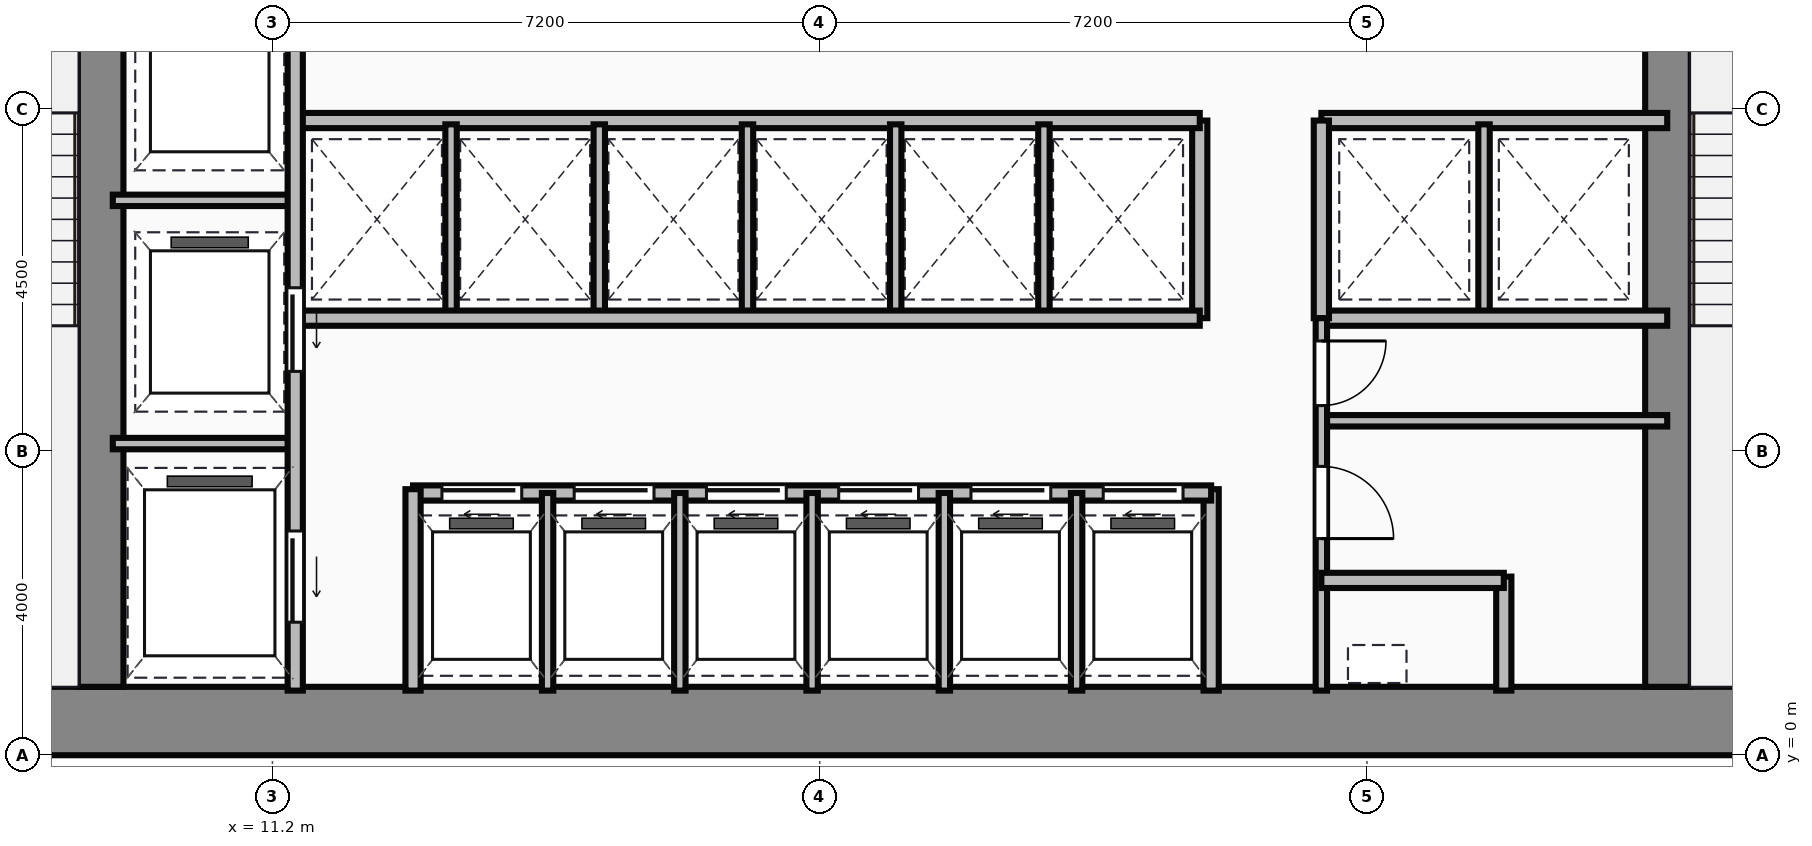
"""IFC4 building model, lengths in metres.
Left out: names, types, materials, properties, quantities, classifications, styles, units other than length and angle.
Written with IfcOpenShell. Run it as: python <this file> out.ifc"""

import sys

from ifc_helpers import new_model, si_unit, direction, frame, frame_2d, origin, place, context, subcontext, project, spatial, rectangle, extrude, source, transform, mapped, element, fill, save


model = new_model("IFC4")
c1 = context("Model", 3, precision=1e-05, world=origin(), true_north=direction((0.0, 1.0)))
c2 = subcontext(c1, "Body", "Model", "MODEL_VIEW")
j1 = project(units=[si_unit("LENGTHUNIT", "METRE"), si_unit("PLANEANGLEUNIT", "RADIAN")], contexts=[c1])
p1 = place(None, origin())
s1 = spatial("IfcSite", under=j1, at=p1, CompositionType="ELEMENT")
p2 = place(p1, origin())
s2 = spatial("IfcBuilding", under=s1, at=p2, CompositionType="ELEMENT")
p3 = place(p2, frame((0.0, 0.0, 58.05)))
s3 = spatial("IfcBuildingStorey", under=s2, at=p3, CompositionType="ELEMENT", Elevation=58.05)
m1 = source(origin(), c2, "Body", "SweptSolid", [
    extrude(rectangle(XDim=29.5, YDim=0.9, at=frame_2d((14.75, 0.0))), origin(), (0.0, 0.0, 1.0), 3.65),
])
p4 = place(p3, frame((4.5, 0.45, 0.0), z_axis=(0.0, 0.0, 1.0), x_axis=(1.0, 0.0, 0.0)))
e1 = element("IfcWall", 1, at=p4, inside=s3, PredefinedType="SHEAR", context=c2, shape_type="MappedRepresentation", body=[
    mapped(m1, transform((0.0, 0.0, 0.0))),
])
m2 = source(origin(), c2, "Body", "SweptSolid", [
    extrude(rectangle(XDim=12.2, YDim=0.6, at=frame_2d((6.1, 0.0))), origin(), (0.0, 0.0, 1.0), 3.65),
])
for number, where, z_axis, x_axis in (
    (2, (8.94, 0.9, 0.0), (0.0, 0.0, 1.0), (0.0, 1.0, 0.0)),
    (3, (29.56, 0.9, 0.0), (0.0, 0.0, 1.0), (0.0, 1.0, 0.0)),
):
    element("IfcWall", number, at=place(p3, frame(where, z_axis=z_axis, x_axis=x_axis)), inside=s3, PredefinedType="SHEAR", context=c2, shape_type="MappedRepresentation", body=[
        mapped(m2, transform((0.0, 0.0, 0.0))),
    ])
m3 = source(origin(), c2, "Body", "SweptSolid", [
    extrude(rectangle(XDim=9.6, YDim=0.2, at=frame_2d((4.8, 0.0))), origin(), (0.0, 0.0, 1.0), 3.4),
])
p5 = place(p3, frame((11.5, 0.85, 0.0), z_axis=(0.0, 0.0, 1.0), x_axis=(0.0, 1.0, 0.0)))
e4 = element("IfcWall", 4, at=p5, inside=s3, PredefinedType="PARTITIONING", context=c2, shape_type="MappedRepresentation", body=[
    mapped(m3, transform((0.0, 0.0, 0.0))),
])
p6 = place(p5, frame((4.2, 0.0, 0.0)))
e5 = element("IfcOpeningElement", 5, at=p6, cuts=e4, PredefinedType="OPENING", context=c2, shape_type="SweptSolid", body=[
    extrude(rectangle(XDim=1.1, YDim=2.15, at=frame_2d((0.55, 1.075))), frame((0.0, 0.11, 0.0), z_axis=(0.0, -1.0, 0.0), x_axis=(1.0, 0.0, 0.0)), (0.0, 0.0, 1.0), 0.22),
])
p7 = place(p5, frame((0.9, 0.0, 0.0)))
e6 = element("IfcOpeningElement", 6, at=p7, cuts=e4, PredefinedType="OPENING", context=c2, shape_type="SweptSolid", body=[
    extrude(rectangle(XDim=1.2, YDim=2.15, at=frame_2d((0.6, 1.075))), frame((0.0, 0.11, 0.0), z_axis=(0.0, -1.0, 0.0), x_axis=(1.0, 0.0, 0.0)), (0.0, 0.0, 1.0), 0.22),
])
m4 = source(origin(), c2, "Body", "SweptSolid", [
    extrude(rectangle(XDim=2.4, YDim=0.15, at=frame_2d((1.2, 0.0))), origin(), (0.0, 0.0, 1.0), 3.4),
])
for number, where, z_axis, x_axis in (
    (7, (9.1, 4.1, 0.0), (0.0, 0.0, 1.0), (1.0, 0.0, 0.0)),
    (8, (9.1, 7.3, 0.0), (0.0, 0.0, 1.0), (1.0, 0.0, 0.0)),
):
    element("IfcWall", number, at=place(p3, frame(where, z_axis=z_axis, x_axis=x_axis)), inside=s3, PredefinedType="PARTITIONING", context=c2, shape_type="MappedRepresentation", body=[
        mapped(m4, transform((0.0, 0.0, 0.0))),
    ])
m5 = source(origin(), c2, "Body", "SweptSolid", [
    extrude(rectangle(XDim=2.65, YDim=0.2, at=frame_2d((1.325, 0.0))), origin(), (0.0, 0.0, 1.0), 3.4),
])
p8 = place(p3, frame((13.05, 0.85, 0.0), z_axis=(0.0, 0.0, 1.0), x_axis=(0.0, 1.0, 0.0)))
e9 = element("IfcWall", 9, at=p8, inside=s3, PredefinedType="PARTITIONING", context=c2, shape_type="MappedRepresentation", body=[
    mapped(m5, transform((0.0, 0.0, 0.0))),
])
m6 = source(origin(), c2, "Body", "SweptSolid", [
    extrude(rectangle(XDim=10.5, YDim=0.2, at=frame_2d((5.25, 0.0))), origin(), (0.0, 0.0, 1.0), 3.4),
])
p9 = place(p3, frame((13.05, 3.45, 0.0), z_axis=(0.0, 0.0, 1.0), x_axis=(1.0, 0.0, 0.0)))
e10 = element("IfcWall", 10, at=p9, inside=s3, PredefinedType="PARTITIONING", context=c2, shape_type="MappedRepresentation", body=[
    mapped(m6, transform((0.0, 0.0, 0.0))),
])
p10 = place(p9, frame((0.38, 0.0, 0.0)))
e11 = element("IfcOpeningElement", 11, at=p10, cuts=e10, PredefinedType="OPENING", context=c2, shape_type="SweptSolid", body=[
    extrude(rectangle(XDim=1.05, YDim=2.15, at=frame_2d((0.525, 1.075))), frame((0.0, 0.11, 0.0), z_axis=(0.0, -1.0, 0.0), x_axis=(1.0, 0.0, 0.0)), (0.0, 0.0, 1.0), 0.22),
])
p11 = place(p9, frame((2.12, 0.0, 0.0)))
e12 = element("IfcOpeningElement", 12, at=p11, cuts=e10, PredefinedType="OPENING", context=c2, shape_type="SweptSolid", body=[
    extrude(rectangle(XDim=1.05, YDim=2.15, at=frame_2d((0.525, 1.075))), frame((0.0, 0.11, 0.0), z_axis=(0.0, -1.0, 0.0), x_axis=(1.0, 0.0, 0.0)), (0.0, 0.0, 1.0), 0.22),
])
p12 = place(p9, frame((3.86, 0.0, 0.0)))
e13 = element("IfcOpeningElement", 13, at=p12, cuts=e10, PredefinedType="OPENING", context=c2, shape_type="SweptSolid", body=[
    extrude(rectangle(XDim=1.05, YDim=2.15, at=frame_2d((0.525, 1.075))), frame((0.0, 0.11, 0.0), z_axis=(0.0, -1.0, 0.0), x_axis=(1.0, 0.0, 0.0)), (0.0, 0.0, 1.0), 0.22),
])
p13 = place(p9, frame((5.6, 0.0, 0.0)))
e14 = element("IfcOpeningElement", 14, at=p13, cuts=e10, PredefinedType="OPENING", context=c2, shape_type="SweptSolid", body=[
    extrude(rectangle(XDim=1.05, YDim=2.15, at=frame_2d((0.525, 1.075))), frame((0.0, 0.11, 0.0), z_axis=(0.0, -1.0, 0.0), x_axis=(1.0, 0.0, 0.0)), (0.0, 0.0, 1.0), 0.22),
])
p14 = place(p9, frame((7.34, 0.0, 0.0)))
e15 = element("IfcOpeningElement", 15, at=p14, cuts=e10, PredefinedType="OPENING", context=c2, shape_type="SweptSolid", body=[
    extrude(rectangle(XDim=1.05, YDim=2.15, at=frame_2d((0.525, 1.075))), frame((0.0, 0.11, 0.0), z_axis=(0.0, -1.0, 0.0), x_axis=(1.0, 0.0, 0.0)), (0.0, 0.0, 1.0), 0.22),
])
p15 = place(p9, frame((9.08, 0.0, 0.0)))
e16 = element("IfcOpeningElement", 16, at=p15, cuts=e10, PredefinedType="OPENING", context=c2, shape_type="SweptSolid", body=[
    extrude(rectangle(XDim=1.05, YDim=2.15, at=frame_2d((0.525, 1.075))), frame((0.0, 0.11, 0.0), z_axis=(0.0, -1.0, 0.0), x_axis=(1.0, 0.0, 0.0)), (0.0, 0.0, 1.0), 0.22),
])
p16 = place(p3, frame((23.55, 0.85, 0.0), z_axis=(0.0, 0.0, 1.0), x_axis=(0.0, 1.0, 0.0)))
e17 = element("IfcWall", 17, at=p16, inside=s3, PredefinedType="PARTITIONING", context=c2, shape_type="MappedRepresentation", body=[
    mapped(m5, transform((0.0, 0.0, 0.0))),
])
m7 = source(origin(), c2, "Body", "SweptSolid", [
    extrude(rectangle(XDim=2.6, YDim=0.15, at=frame_2d((1.3, 0.0))), origin(), (0.0, 0.0, 1.0), 3.4),
])
for number, where, z_axis, x_axis in (
    (18, (14.82, 0.85, 0.0), (0.0, 0.0, 1.0), (0.0, 1.0, 0.0)),
    (19, (16.56, 0.85, 0.0), (0.0, 0.0, 1.0), (0.0, 1.0, 0.0)),
    (20, (18.3, 0.85, 0.0), (0.0, 0.0, 1.0), (0.0, 1.0, 0.0)),
    (21, (20.04, 0.85, 0.0), (0.0, 0.0, 1.0), (0.0, 1.0, 0.0)),
    (22, (21.78, 0.85, 0.0), (0.0, 0.0, 1.0), (0.0, 1.0, 0.0)),
):
    element("IfcWall", number, at=place(p3, frame(where, z_axis=z_axis, x_axis=x_axis)), inside=s3, PredefinedType="PARTITIONING", context=c2, shape_type="MappedRepresentation", body=[
        mapped(m7, transform((0.0, 0.0, 0.0))),
    ])
m8 = source(origin(), c2, "Body", "SweptSolid", [
    extrude(rectangle(XDim=11.85, YDim=0.2, at=frame_2d((5.925, 0.0))), origin(), (0.0, 0.0, 1.0), 3.4),
])
for number, where, z_axis, x_axis in (
    (23, (11.55, 5.75, 0.0), (0.0, 0.0, 1.0), (1.0, 0.0, 0.0)),
    (24, (11.55, 8.35, 0.0), (0.0, 0.0, 1.0), (1.0, 0.0, 0.0)),
):
    element("IfcWall", number, at=place(p3, frame(where, z_axis=z_axis, x_axis=x_axis)), inside=s3, PredefinedType="PARTITIONING", context=c2, shape_type="MappedRepresentation", body=[
        mapped(m8, transform((0.0, 0.0, 0.0))),
    ])
m9 = source(origin(), c2, "Body", "SweptSolid", [
    extrude(rectangle(XDim=2.6, YDim=0.2, at=frame_2d((1.3, 0.0))), origin(), (0.0, 0.0, 1.0), 3.4),
])
p17 = place(p3, frame((23.4, 5.75, 0.0), z_axis=(0.0, 0.0, 1.0), x_axis=(0.0, 1.0, 0.0)))
e25 = element("IfcWall", 25, at=p17, inside=s3, PredefinedType="PARTITIONING", context=c2, shape_type="MappedRepresentation", body=[
    mapped(m9, transform((0.0, 0.0, 0.0))),
])
m10 = source(origin(), c2, "Body", "SweptSolid", [
    extrude(rectangle(XDim=2.5, YDim=0.15, at=frame_2d((1.25, 0.0))), origin(), (0.0, 0.0, 1.0), 3.4),
])
for number, where, z_axis, x_axis in (
    (26, (13.55, 5.8, 0.0), (0.0, 0.0, 1.0), (0.0, 1.0, 0.0)),
    (27, (15.5, 5.8, 0.0), (0.0, 0.0, 1.0), (0.0, 1.0, 0.0)),
    (28, (17.45, 5.8, 0.0), (0.0, 0.0, 1.0), (0.0, 1.0, 0.0)),
    (29, (19.4, 5.8, 0.0), (0.0, 0.0, 1.0), (0.0, 1.0, 0.0)),
    (30, (21.35, 5.8, 0.0), (0.0, 0.0, 1.0), (0.0, 1.0, 0.0)),
):
    element("IfcWall", number, at=place(p3, frame(where, z_axis=z_axis, x_axis=x_axis)), inside=s3, PredefinedType="PARTITIONING", context=c2, shape_type="MappedRepresentation", body=[
        mapped(m10, transform((0.0, 0.0, 0.0))),
    ])
m11 = source(origin(), c2, "Body", "SweptSolid", [
    extrude(rectangle(XDim=4.55, YDim=0.2, at=frame_2d((2.275, 0.0))), origin(), (0.0, 0.0, 1.0), 3.4),
])
for number, where, z_axis, x_axis in (
    (31, (25.0, 8.35, 0.0), (0.0, 0.0, 1.0), (1.0, 0.0, 0.0)),
    (32, (25.0, 5.75, 0.0), (0.0, 0.0, 1.0), (1.0, 0.0, 0.0)),
):
    element("IfcWall", number, at=place(p3, frame(where, z_axis=z_axis, x_axis=x_axis)), inside=s3, PredefinedType="PARTITIONING", context=c2, shape_type="MappedRepresentation", body=[
        mapped(m11, transform((0.0, 0.0, 0.0))),
    ])
p18 = place(p3, frame((25.0, 5.75, 0.0), z_axis=(0.0, 0.0, 1.0), x_axis=(0.0, 1.0, 0.0)))
e33 = element("IfcWall", 33, at=p18, inside=s3, PredefinedType="PARTITIONING", context=c2, shape_type="MappedRepresentation", body=[
    mapped(m9, transform((0.0, 0.0, 0.0))),
])
p19 = place(p3, frame((27.14, 5.8, 0.0), z_axis=(0.0, 0.0, 1.0), x_axis=(0.0, 1.0, 0.0)))
e34 = element("IfcWall", 34, at=p19, inside=s3, PredefinedType="PARTITIONING", context=c2, shape_type="MappedRepresentation", body=[
    mapped(m10, transform((0.0, 0.0, 0.0))),
])
m12 = source(origin(), c2, "Body", "SweptSolid", [
    extrude(rectangle(XDim=4.9, YDim=0.15, at=frame_2d((2.45, 0.0))), origin(), (0.0, 0.0, 1.0), 3.4),
])
p20 = place(p3, frame((25.0, 0.85, 0.0), z_axis=(0.0, 0.0, 1.0), x_axis=(0.0, 1.0, 0.0)))
e35 = element("IfcWall", 35, at=p20, inside=s3, PredefinedType="PARTITIONING", context=c2, shape_type="MappedRepresentation", body=[
    mapped(m12, transform((0.0, 0.0, 0.0))),
])
p21 = place(p20, frame((2.0, 0.0, 0.0)))
e36 = element("IfcOpeningElement", 36, at=p21, cuts=e35, PredefinedType="OPENING", context=c2, shape_type="SweptSolid", body=[
    extrude(rectangle(XDim=0.95, YDim=2.15, at=frame_2d((0.475, 1.075))), frame((0.0, 0.085, 0.0), z_axis=(0.0, -1.0, 0.0), x_axis=(1.0, 0.0, 0.0)), (0.0, 0.0, 1.0), 0.17),
])
p22 = place(p20, frame((3.75, 0.0, 0.0)))
e37 = element("IfcOpeningElement", 37, at=p22, cuts=e35, PredefinedType="OPENING", context=c2, shape_type="SweptSolid", body=[
    extrude(rectangle(XDim=0.85, YDim=2.15, at=frame_2d((0.425, 1.075))), frame((0.0, 0.085, 0.0), z_axis=(0.0, -1.0, 0.0), x_axis=(1.0, 0.0, 0.0)), (0.0, 0.0, 1.0), 0.17),
])
m13 = source(origin(), c2, "Body", "SweptSolid", [
    extrude(rectangle(XDim=2.4, YDim=0.2, at=frame_2d((1.2, 0.0))), origin(), (0.0, 0.0, 1.0), 3.4),
])
p23 = place(p3, frame((25.0, 2.3, 0.0), z_axis=(0.0, 0.0, 1.0), x_axis=(1.0, 0.0, 0.0)))
e38 = element("IfcWall", 38, at=p23, inside=s3, PredefinedType="PARTITIONING", context=c2, shape_type="MappedRepresentation", body=[
    mapped(m13, transform((0.0, 0.0, 0.0))),
])
m14 = source(origin(), c2, "Body", "SweptSolid", [
    extrude(rectangle(XDim=1.5, YDim=0.2, at=frame_2d((0.75, 0.0))), origin(), (0.0, 0.0, 1.0), 3.4),
])
p24 = place(p3, frame((27.4, 0.85, 0.0), z_axis=(0.0, 0.0, 1.0), x_axis=(0.0, 1.0, 0.0)))
e39 = element("IfcWall", 39, at=p24, inside=s3, PredefinedType="PARTITIONING", context=c2, shape_type="MappedRepresentation", body=[
    mapped(m14, transform((0.0, 0.0, 0.0))),
])
m15 = source(origin(), c2, "Body", "SweptSolid", [
    extrude(rectangle(XDim=4.55, YDim=0.15, at=frame_2d((2.275, 0.0))), origin(), (0.0, 0.0, 1.0), 3.4),
])
p25 = place(p3, frame((25.0, 4.4, 0.0), z_axis=(0.0, 0.0, 1.0), x_axis=(1.0, 0.0, 0.0)))
e40 = element("IfcWall", 40, at=p25, inside=s3, PredefinedType="PARTITIONING", context=c2, shape_type="MappedRepresentation", body=[
    mapped(m15, transform((0.0, 0.0, 0.0))),
])
m16 = source(origin(), c2, "Body", "SweptSolid", [
    extrude(rectangle(XDim=1.1, YDim=2.15, at=frame_2d((0.55, 1.075))), frame((0.0, 0.025, 0.0), z_axis=(0.0, -1.0, 0.0), x_axis=(1.0, 0.0, 0.0)), (0.0, 0.0, 1.0), 0.05),
])
p26 = place(p6, frame((1.1, 0.0, 0.0), z_axis=(0.0, 0.0, 1.0), x_axis=(-1.0, 0.0, 0.0)))
e41 = element("IfcDoor", 41, at=p26, inside=s3, OperationType="SLIDING_TO_LEFT", PredefinedType="DOOR", context=c2, shape_type="MappedRepresentation", body=[
    mapped(m16, transform((0.0, 0.0, 0.0))),
])
fill(e5, e41)
m17 = source(origin(), c2, "Body", "SweptSolid", [
    extrude(rectangle(XDim=1.2, YDim=2.15, at=frame_2d((0.6, 1.075))), frame((0.0, 0.025, 0.0), z_axis=(0.0, -1.0, 0.0), x_axis=(1.0, 0.0, 0.0)), (0.0, 0.0, 1.0), 0.05),
])
p27 = place(p7, frame((1.2, 0.0, 0.0), z_axis=(0.0, 0.0, 1.0), x_axis=(-1.0, 0.0, 0.0)))
e42 = element("IfcDoor", 42, at=p27, inside=s3, OperationType="SLIDING_TO_LEFT", PredefinedType="DOOR", context=c2, shape_type="MappedRepresentation", body=[
    mapped(m17, transform((0.0, 0.0, 0.0))),
])
fill(e6, e42)
m18 = source(origin(), c2, "Body", "SweptSolid", [
    extrude(rectangle(XDim=1.05, YDim=2.15, at=frame_2d((0.525, 1.075))), frame((0.0, 0.025, 0.0), z_axis=(0.0, -1.0, 0.0), x_axis=(1.0, 0.0, 0.0)), (0.0, 0.0, 1.0), 0.05),
])
p28 = place(p10, origin())
e43 = element("IfcDoor", 43, at=p28, inside=s3, OperationType="SLIDING_TO_LEFT", PredefinedType="DOOR", context=c2, shape_type="MappedRepresentation", body=[
    mapped(m18, transform((0.0, 0.0, 0.0))),
])
fill(e11, e43)
p29 = place(p11, origin())
e44 = element("IfcDoor", 44, at=p29, inside=s3, OperationType="SLIDING_TO_LEFT", PredefinedType="DOOR", context=c2, shape_type="MappedRepresentation", body=[
    mapped(m18, transform((0.0, 0.0, 0.0))),
])
fill(e12, e44)
p30 = place(p12, origin())
e45 = element("IfcDoor", 45, at=p30, inside=s3, OperationType="SLIDING_TO_LEFT", PredefinedType="DOOR", context=c2, shape_type="MappedRepresentation", body=[
    mapped(m18, transform((0.0, 0.0, 0.0))),
])
fill(e13, e45)
p31 = place(p13, origin())
e46 = element("IfcDoor", 46, at=p31, inside=s3, OperationType="SLIDING_TO_LEFT", PredefinedType="DOOR", context=c2, shape_type="MappedRepresentation", body=[
    mapped(m18, transform((0.0, 0.0, 0.0))),
])
fill(e14, e46)
p32 = place(p14, origin())
e47 = element("IfcDoor", 47, at=p32, inside=s3, OperationType="SLIDING_TO_LEFT", PredefinedType="DOOR", context=c2, shape_type="MappedRepresentation", body=[
    mapped(m18, transform((0.0, 0.0, 0.0))),
])
fill(e15, e47)
p33 = place(p15, origin())
e48 = element("IfcDoor", 48, at=p33, inside=s3, OperationType="SLIDING_TO_LEFT", PredefinedType="DOOR", context=c2, shape_type="MappedRepresentation", body=[
    mapped(m18, transform((0.0, 0.0, 0.0))),
])
fill(e16, e48)
m19 = source(origin(), c2, "Body", "SweptSolid", [
    extrude(rectangle(XDim=0.95, YDim=2.15, at=frame_2d((0.475, 1.075))), frame((0.0, 0.025, 0.0), z_axis=(0.0, -1.0, 0.0), x_axis=(1.0, 0.0, 0.0)), (0.0, 0.0, 1.0), 0.05),
])
p34 = place(p21, origin())
e49 = element("IfcDoor", 49, at=p34, inside=s3, OperationType="SINGLE_SWING_LEFT", PredefinedType="DOOR", context=c2, shape_type="MappedRepresentation", body=[
    mapped(m19, transform((0.0, 0.0, 0.0))),
])
fill(e36, e49)
m20 = source(origin(), c2, "Body", "SweptSolid", [
    extrude(rectangle(XDim=0.85, YDim=2.15, at=frame_2d((0.425, 1.075))), frame((0.0, 0.025, 0.0), z_axis=(0.0, -1.0, 0.0), x_axis=(1.0, 0.0, 0.0)), (0.0, 0.0, 1.0), 0.05),
])
p35 = place(p22, origin())
e50 = element("IfcDoor", 50, at=p35, inside=s3, OperationType="SINGLE_SWING_RIGHT", PredefinedType="DOOR", context=c2, shape_type="MappedRepresentation", body=[
    mapped(m20, transform((0.0, 0.0, 0.0))),
])
fill(e37, e50)
save(model, sys.argv[1])
